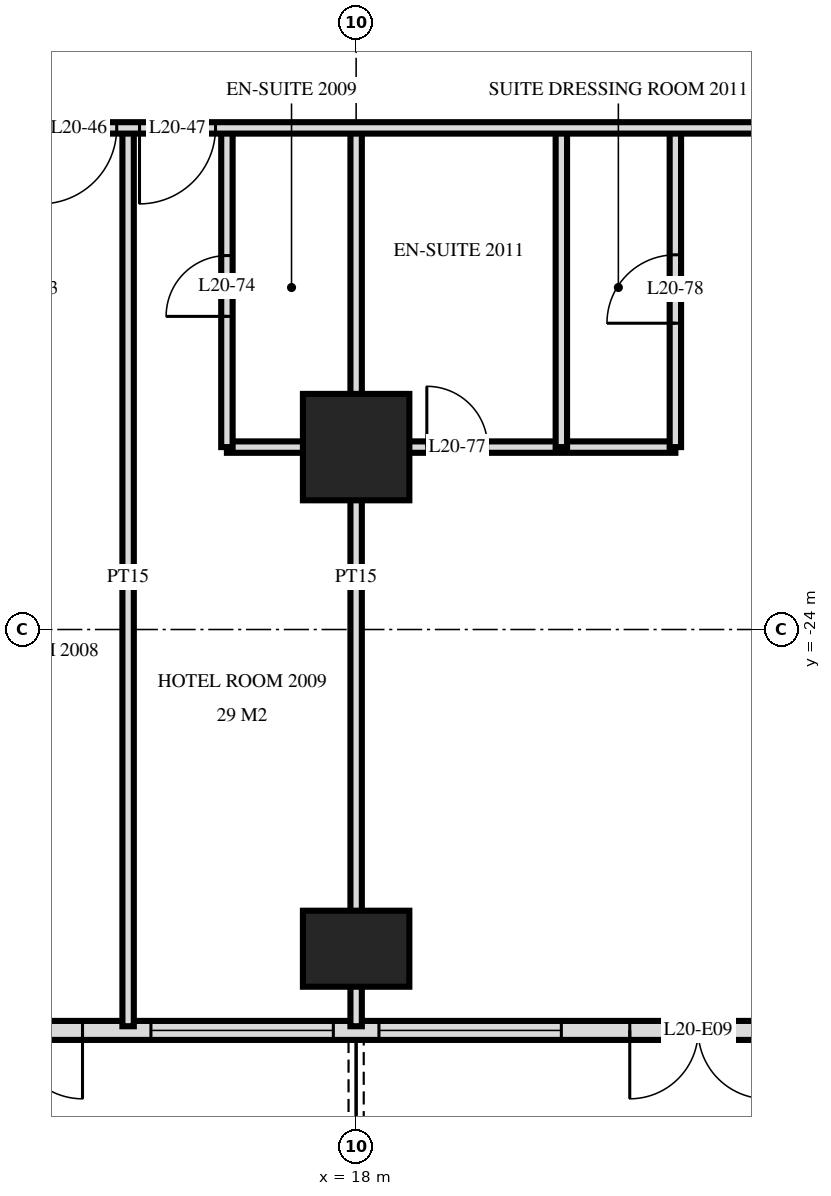
"""IFC4 building model, lengths in metres.
Left out: names, types, materials, properties, quantities, classifications, styles, units other than length and angle.
Written with IfcOpenShell. Run it as: python <this file> out.ifc"""

import sys

from ifc_helpers import new_model, si_unit, direction, frame, frame_2d, origin, origin_2d, place, context, subcontext, project, spatial, rectangle, extrude, element, fill, save


model = new_model("IFC4")
c1 = context("Model", 3, precision=1e-05, world=origin(), true_north=direction((0.0, 1.0)))
c2 = subcontext(c1, "Body", "Model", "MODEL_VIEW")
j1 = project(units=[si_unit("LENGTHUNIT", "METRE"), si_unit("PLANEANGLEUNIT", "RADIAN")], contexts=[c1])
p1 = place(None, origin())
s1 = spatial("IfcSite", under=j1, at=p1, CompositionType="ELEMENT")
p2 = place(p1, origin())
s2 = spatial("IfcBuilding", under=s1, at=p2, CompositionType="ELEMENT")
p3 = place(p2, frame((0.0, 0.0, 81.6)))
s3 = spatial("IfcBuildingStorey", under=s2, at=p3, CompositionType="ELEMENT", Elevation=81.6)
p4 = place(p3, frame((18.0, -28.2, 0.0), z_axis=(0.0, 0.0, 1.0), x_axis=(1.0, 0.0, 0.0)))
e1 = element("IfcColumn", 1, at=p4, inside=s3, PredefinedType="COLUMN", context=c2, shape_type="SweptSolid", body=[
    extrude(rectangle(XDim=1.4, YDim=1.0, at=origin_2d()), origin(), (0.0, 0.0, 1.0), 3.6),
])
p5 = place(p3, frame((18.0, -21.6, 0.0), z_axis=(0.0, 0.0, 1.0), x_axis=(1.0, 0.0, 0.0)))
e2 = element("IfcColumn", 2, at=p5, inside=s3, PredefinedType="COLUMN", context=c2, shape_type="SweptSolid", body=[
    extrude(rectangle(XDim=1.4, YDim=1.4, at=origin_2d()), origin(), (0.0, 0.0, 1.0), 3.6),
])
p6 = place(p3, frame((-28.775, -29.275, 0.0), z_axis=(0.0, 0.0, 1.0), x_axis=(1.0, 0.0, 0.0)))
e3 = element("IfcWall", 3, at=p6, inside=s3, PredefinedType="SOLIDWALL", context=c2, shape_type="SweptSolid", body=[
    extrude(rectangle(XDim=57.551, YDim=0.25, at=frame_2d((28.775, 0.0))), origin(), (0.0, 0.0, 1.0), 3.32),
])
p7 = place(p6, frame((0.575, 0.0, 0.0)))
e4 = element("IfcOpeningElement", 4, at=p7, cuts=e3, PredefinedType="OPENING", context=c2, shape_type="SweptSolid", body=[
    extrude(rectangle(XDim=1.8, YDim=2.4, at=frame_2d((0.9, 1.2))), frame((0.0, 0.135, 0.0), z_axis=(0.0, -1.0, 0.0), x_axis=(1.0, 0.0, 0.0)), (0.0, 0.0, 1.0), 0.27),
])
p8 = place(p6, frame((5.375, 0.0, 0.0)))
e5 = element("IfcOpeningElement", 5, at=p8, cuts=e3, PredefinedType="OPENING", context=c2, shape_type="SweptSolid", body=[
    extrude(rectangle(XDim=1.8, YDim=2.4, at=frame_2d((0.9, 1.2))), frame((0.0, 0.135, 0.0), z_axis=(0.0, -1.0, 0.0), x_axis=(1.0, 0.0, 0.0)), (0.0, 0.0, 1.0), 0.27),
])
p9 = place(p6, frame((8.075, 0.0, 0.3)))
e6 = element("IfcOpeningElement", 6, at=p9, cuts=e3, PredefinedType="OPENING", context=c2, shape_type="SweptSolid", body=[
    extrude(rectangle(XDim=2.4, YDim=2.1, at=frame_2d((1.2, 1.05))), frame((0.0, 0.135, 0.0), z_axis=(0.0, -1.0, 0.0), x_axis=(1.0, 0.0, 0.0)), (0.0, 0.0, 1.0), 0.27),
])
p10 = place(p6, frame((12.875, 0.0, 0.0)))
e7 = element("IfcOpeningElement", 7, at=p10, cuts=e3, PredefinedType="OPENING", context=c2, shape_type="SweptSolid", body=[
    extrude(rectangle(XDim=1.8, YDim=2.4, at=frame_2d((0.9, 1.2))), frame((0.0, 0.135, 0.0), z_axis=(0.0, -1.0, 0.0), x_axis=(1.0, 0.0, 0.0)), (0.0, 0.0, 1.0), 0.27),
])
p11 = place(p6, frame((17.375, 0.0, 0.0)))
e8 = element("IfcOpeningElement", 8, at=p11, cuts=e3, PredefinedType="OPENING", context=c2, shape_type="SweptSolid", body=[
    extrude(rectangle(XDim=1.8, YDim=2.4, at=frame_2d((0.9, 1.2))), frame((0.0, 0.135, 0.0), z_axis=(0.0, -1.0, 0.0), x_axis=(1.0, 0.0, 0.0)), (0.0, 0.0, 1.0), 0.27),
])
p12 = place(p6, frame((20.075, 0.0, 0.3)))
e9 = element("IfcOpeningElement", 9, at=p12, cuts=e3, PredefinedType="OPENING", context=c2, shape_type="SweptSolid", body=[
    extrude(rectangle(XDim=2.4, YDim=2.1, at=frame_2d((1.2, 1.05))), frame((0.0, 0.135, 0.0), z_axis=(0.0, -1.0, 0.0), x_axis=(1.0, 0.0, 0.0)), (0.0, 0.0, 1.0), 0.27),
])
p13 = place(p6, frame((23.075, 0.0, 0.3)))
e10 = element("IfcOpeningElement", 10, at=p13, cuts=e3, PredefinedType="OPENING", context=c2, shape_type="SweptSolid", body=[
    extrude(rectangle(XDim=2.4, YDim=2.1, at=frame_2d((1.2, 1.05))), frame((0.0, 0.135, 0.0), z_axis=(0.0, -1.0, 0.0), x_axis=(1.0, 0.0, 0.0)), (0.0, 0.0, 1.0), 0.27),
])
p14 = place(p6, frame((26.375, 0.0, 0.0)))
e11 = element("IfcOpeningElement", 11, at=p14, cuts=e3, PredefinedType="OPENING", context=c2, shape_type="SweptSolid", body=[
    extrude(rectangle(XDim=1.8, YDim=2.4, at=frame_2d((0.9, 1.2))), frame((0.0, 0.135, 0.0), z_axis=(0.0, -1.0, 0.0), x_axis=(1.0, 0.0, 0.0)), (0.0, 0.0, 1.0), 0.27),
])
p15 = place(p6, frame((29.075, 0.0, 0.3)))
e12 = element("IfcOpeningElement", 12, at=p15, cuts=e3, PredefinedType="OPENING", context=c2, shape_type="SweptSolid", body=[
    extrude(rectangle(XDim=2.4, YDim=2.1, at=frame_2d((1.2, 1.05))), frame((0.0, 0.135, 0.0), z_axis=(0.0, -1.0, 0.0), x_axis=(1.0, 0.0, 0.0)), (0.0, 0.0, 1.0), 0.27),
])
p16 = place(p6, frame((32.375, 0.0, 0.0)))
e13 = element("IfcOpeningElement", 13, at=p16, cuts=e3, PredefinedType="OPENING", context=c2, shape_type="SweptSolid", body=[
    extrude(rectangle(XDim=1.8, YDim=2.4, at=frame_2d((0.9, 1.2))), frame((0.0, 0.135, 0.0), z_axis=(0.0, -1.0, 0.0), x_axis=(1.0, 0.0, 0.0)), (0.0, 0.0, 1.0), 0.27),
])
p17 = place(p6, frame((35.375, 0.0, 0.0)))
e14 = element("IfcOpeningElement", 14, at=p17, cuts=e3, PredefinedType="OPENING", context=c2, shape_type="SweptSolid", body=[
    extrude(rectangle(XDim=1.8, YDim=2.4, at=frame_2d((0.9, 1.2))), frame((0.0, 0.135, 0.0), z_axis=(0.0, -1.0, 0.0), x_axis=(1.0, 0.0, 0.0)), (0.0, 0.0, 1.0), 0.27),
])
p18 = place(p6, frame((38.075, 0.0, 0.3)))
e15 = element("IfcOpeningElement", 15, at=p18, cuts=e3, PredefinedType="OPENING", context=c2, shape_type="SweptSolid", body=[
    extrude(rectangle(XDim=2.4, YDim=2.1, at=frame_2d((1.2, 1.05))), frame((0.0, 0.135, 0.0), z_axis=(0.0, -1.0, 0.0), x_axis=(1.0, 0.0, 0.0)), (0.0, 0.0, 1.0), 0.27),
])
p19 = place(p6, frame((41.375, 0.0, 0.0)))
e16 = element("IfcOpeningElement", 16, at=p19, cuts=e3, PredefinedType="OPENING", context=c2, shape_type="SweptSolid", body=[
    extrude(rectangle(XDim=1.8, YDim=2.4, at=frame_2d((0.9, 1.2))), frame((0.0, 0.135, 0.0), z_axis=(0.0, -1.0, 0.0), x_axis=(1.0, 0.0, 0.0)), (0.0, 0.0, 1.0), 0.27),
])
p20 = place(p6, frame((44.075, 0.0, 0.3)))
e17 = element("IfcOpeningElement", 17, at=p20, cuts=e3, PredefinedType="OPENING", context=c2, shape_type="SweptSolid", body=[
    extrude(rectangle(XDim=2.4, YDim=2.1, at=frame_2d((1.2, 1.05))), frame((0.0, 0.135, 0.0), z_axis=(0.0, -1.0, 0.0), x_axis=(1.0, 0.0, 0.0)), (0.0, 0.0, 1.0), 0.27),
])
p21 = place(p6, frame((47.075, 0.0, 0.3)))
e18 = element("IfcOpeningElement", 18, at=p21, cuts=e3, PredefinedType="OPENING", context=c2, shape_type="SweptSolid", body=[
    extrude(rectangle(XDim=2.4, YDim=2.1, at=frame_2d((1.2, 1.05))), frame((0.0, 0.135, 0.0), z_axis=(0.0, -1.0, 0.0), x_axis=(1.0, 0.0, 0.0)), (0.0, 0.0, 1.0), 0.27),
])
p22 = place(p6, frame((50.375, 0.0, 0.0)))
e19 = element("IfcOpeningElement", 19, at=p22, cuts=e3, PredefinedType="OPENING", context=c2, shape_type="SweptSolid", body=[
    extrude(rectangle(XDim=1.8, YDim=2.4, at=frame_2d((0.9, 1.2))), frame((0.0, 0.135, 0.0), z_axis=(0.0, -1.0, 0.0), x_axis=(1.0, 0.0, 0.0)), (0.0, 0.0, 1.0), 0.27),
])
p23 = place(p6, frame((53.375, 0.0, 0.0)))
e20 = element("IfcOpeningElement", 20, at=p23, cuts=e3, PredefinedType="OPENING", context=c2, shape_type="SweptSolid", body=[
    extrude(rectangle(XDim=1.8, YDim=2.4, at=frame_2d((0.9, 1.2))), frame((0.0, 0.135, 0.0), z_axis=(0.0, -1.0, 0.0), x_axis=(1.0, 0.0, 0.0)), (0.0, 0.0, 1.0), 0.27),
])
p24 = place(p3, frame((22.2, -21.6, 0.0), z_axis=(0.0, 0.0, 1.0), x_axis=(0.0, 1.0, 0.0)))
e21 = element("IfcWall", 21, at=p24, inside=s3, PredefinedType="PARTITIONING", context=c2, shape_type="SweptSolid", body=[
    extrude(rectangle(XDim=4.2, YDim=0.15, at=frame_2d((2.1, 0.0))), origin(), (0.0, 0.0, 1.0), 3.32),
])
p25 = place(p24, frame((1.63, 0.0, 0.0)))
e22 = element("IfcOpeningElement", 22, at=p25, cuts=e21, PredefinedType="OPENING", context=c2, shape_type="SweptSolid", body=[
    extrude(rectangle(XDim=0.9, YDim=2.1, at=frame_2d((0.45, 1.05))), frame((0.0, 0.085, 0.0), z_axis=(0.0, -1.0, 0.0), x_axis=(1.0, 0.0, 0.0)), (0.0, 0.0, 1.0), 0.17),
])
p26 = place(p3, frame((20.7, -21.6, 0.0), z_axis=(0.0, 0.0, 1.0), x_axis=(0.0, 1.0, 0.0)))
e23 = element("IfcWall", 23, at=p26, inside=s3, PredefinedType="PARTITIONING", context=c2, shape_type="SweptSolid", body=[
    extrude(rectangle(XDim=4.2, YDim=0.15, at=frame_2d((2.1, 0.0))), origin(), (0.0, 0.0, 1.0), 3.32),
])
p27 = place(p3, frame((18.0, -29.22, 0.0), z_axis=(0.0, 0.0, 1.0), x_axis=(0.0, 1.0, 0.0)))
e24 = element("IfcWall", 24, at=p27, inside=s3, PredefinedType="PARTITIONING", context=c2, shape_type="SweptSolid", body=[
    extrude(rectangle(XDim=11.82, YDim=0.15, at=frame_2d((5.91, 0.0))), origin(), (0.0, 0.0, 1.0), 3.32),
])
p28 = place(p3, frame((16.3, -21.6, 0.0), z_axis=(0.0, 0.0, 1.0), x_axis=(0.0, 1.0, 0.0)))
e25 = element("IfcWall", 25, at=p28, inside=s3, PredefinedType="PARTITIONING", context=c2, shape_type="SweptSolid", body=[
    extrude(rectangle(XDim=4.2, YDim=0.15, at=frame_2d((2.1, 0.0))), origin(), (0.0, 0.0, 1.0), 3.32),
])
p29 = place(p28, frame((1.72, 0.0, 0.0)))
e26 = element("IfcOpeningElement", 26, at=p29, cuts=e25, PredefinedType="OPENING", context=c2, shape_type="SweptSolid", body=[
    extrude(rectangle(XDim=0.8, YDim=2.1, at=frame_2d((0.4, 1.05))), frame((0.0, 0.085, 0.0), z_axis=(0.0, -1.0, 0.0), x_axis=(1.0, 0.0, 0.0)), (0.0, 0.0, 1.0), 0.17),
])
p30 = place(p3, frame((15.0, -29.22, 0.0), z_axis=(0.0, 0.0, 1.0), x_axis=(0.0, 1.0, 0.0)))
e27 = element("IfcWall", 27, at=p30, inside=s3, PredefinedType="PARTITIONING", context=c2, shape_type="SweptSolid", body=[
    extrude(rectangle(XDim=11.82, YDim=0.15, at=frame_2d((5.91, 0.0))), origin(), (0.0, 0.0, 1.0), 3.32),
])
p31 = place(p3, frame((16.3, -21.6, 0.0), z_axis=(0.0, 0.0, 1.0), x_axis=(1.0, 0.0, 0.0)))
e28 = element("IfcWall", 28, at=p31, inside=s3, PredefinedType="PARTITIONING", context=c2, shape_type="SweptSolid", body=[
    extrude(rectangle(XDim=5.9, YDim=0.15, at=frame_2d((2.95, 0.0))), origin(), (0.0, 0.0, 1.0), 3.32),
])
p32 = place(p31, frame((2.63, 0.0, 0.0)))
e29 = element("IfcOpeningElement", 29, at=p32, cuts=e28, PredefinedType="OPENING", context=c2, shape_type="SweptSolid", body=[
    extrude(rectangle(XDim=0.8, YDim=2.1, at=frame_2d((0.4, 1.05))), frame((0.0, 0.085, 0.0), z_axis=(0.0, -1.0, 0.0), x_axis=(1.0, 0.0, 0.0)), (0.0, 0.0, 1.0), 0.17),
])
p33 = place(p3, frame((-33.12, -17.4, 0.0), z_axis=(0.0, 0.0, 1.0), x_axis=(1.0, 0.0, 0.0)))
e30 = element("IfcWall", 30, at=p33, inside=s3, PredefinedType="PARTITIONING", context=c2, shape_type="SweptSolid", body=[
    extrude(rectangle(XDim=66.24, YDim=0.15, at=frame_2d((33.12, 0.0))), origin(), (0.0, 0.0, 1.0), 3.32),
])
p34 = place(p33, frame((9.27, 0.0, 0.0)))
e31 = element("IfcOpeningElement", 31, at=p34, cuts=e30, PredefinedType="OPENING", context=c2, shape_type="SweptSolid", body=[
    extrude(rectangle(XDim=1.0, YDim=2.1, at=frame_2d((0.5, 1.05))), frame((0.0, 0.085, 0.0), z_axis=(0.0, -1.0, 0.0), x_axis=(1.0, 0.0, 0.0)), (0.0, 0.0, 1.0), 0.17),
])
p35 = place(p33, frame((13.97, 0.0, 0.0)))
e32 = element("IfcOpeningElement", 32, at=p35, cuts=e30, PredefinedType="OPENING", context=c2, shape_type="SweptSolid", body=[
    extrude(rectangle(XDim=1.0, YDim=2.1, at=frame_2d((0.5, 1.05))), frame((0.0, 0.085, 0.0), z_axis=(0.0, -1.0, 0.0), x_axis=(1.0, 0.0, 0.0)), (0.0, 0.0, 1.0), 0.17),
])
p36 = place(p33, frame((17.62, 0.0, 0.0)))
e33 = element("IfcOpeningElement", 33, at=p36, cuts=e30, PredefinedType="OPENING", context=c2, shape_type="SweptSolid", body=[
    extrude(rectangle(XDim=1.0, YDim=2.1, at=frame_2d((0.5, 1.05))), frame((0.0, 0.085, 0.0), z_axis=(0.0, -1.0, 0.0), x_axis=(1.0, 0.0, 0.0)), (0.0, 0.0, 1.0), 0.17),
])
p37 = place(p33, frame((21.27, 0.0, 0.0)))
e34 = element("IfcOpeningElement", 34, at=p37, cuts=e30, PredefinedType="OPENING", context=c2, shape_type="SweptSolid", body=[
    extrude(rectangle(XDim=1.0, YDim=2.1, at=frame_2d((0.5, 1.05))), frame((0.0, 0.085, 0.0), z_axis=(0.0, -1.0, 0.0), x_axis=(1.0, 0.0, 0.0)), (0.0, 0.0, 1.0), 0.17),
])
p38 = place(p33, frame((25.97, 0.0, 0.0)))
e35 = element("IfcOpeningElement", 35, at=p38, cuts=e30, PredefinedType="OPENING", context=c2, shape_type="SweptSolid", body=[
    extrude(rectangle(XDim=1.0, YDim=2.1, at=frame_2d((0.5, 1.05))), frame((0.0, 0.085, 0.0), z_axis=(0.0, -1.0, 0.0), x_axis=(1.0, 0.0, 0.0)), (0.0, 0.0, 1.0), 0.17),
])
p39 = place(p33, frame((35.62, 0.0, 0.0)))
e36 = element("IfcOpeningElement", 36, at=p39, cuts=e30, PredefinedType="OPENING", context=c2, shape_type="SweptSolid", body=[
    extrude(rectangle(XDim=1.0, YDim=2.1, at=frame_2d((0.5, 1.05))), frame((0.0, 0.085, 0.0), z_axis=(0.0, -1.0, 0.0), x_axis=(1.0, 0.0, 0.0)), (0.0, 0.0, 1.0), 0.17),
])
p40 = place(p33, frame((40.97, 0.0, 0.0)))
e37 = element("IfcOpeningElement", 37, at=p40, cuts=e30, PredefinedType="OPENING", context=c2, shape_type="SweptSolid", body=[
    extrude(rectangle(XDim=1.0, YDim=2.1, at=frame_2d((0.5, 1.05))), frame((0.0, 0.085, 0.0), z_axis=(0.0, -1.0, 0.0), x_axis=(1.0, 0.0, 0.0)), (0.0, 0.0, 1.0), 0.17),
])
p41 = place(p33, frame((42.27, 0.0, 0.0)))
e38 = element("IfcOpeningElement", 38, at=p41, cuts=e30, PredefinedType="OPENING", context=c2, shape_type="SweptSolid", body=[
    extrude(rectangle(XDim=1.0, YDim=2.1, at=frame_2d((0.5, 1.05))), frame((0.0, 0.085, 0.0), z_axis=(0.0, -1.0, 0.0), x_axis=(1.0, 0.0, 0.0)), (0.0, 0.0, 1.0), 0.17),
])
p42 = place(p33, frame((46.97, 0.0, 0.0)))
e39 = element("IfcOpeningElement", 39, at=p42, cuts=e30, PredefinedType="OPENING", context=c2, shape_type="SweptSolid", body=[
    extrude(rectangle(XDim=1.0, YDim=2.1, at=frame_2d((0.5, 1.05))), frame((0.0, 0.085, 0.0), z_axis=(0.0, -1.0, 0.0), x_axis=(1.0, 0.0, 0.0)), (0.0, 0.0, 1.0), 0.17),
])
p43 = place(p33, frame((48.27, 0.0, 0.0)))
e40 = element("IfcOpeningElement", 40, at=p43, cuts=e30, PredefinedType="OPENING", context=c2, shape_type="SweptSolid", body=[
    extrude(rectangle(XDim=1.0, YDim=2.1, at=frame_2d((0.5, 1.05))), frame((0.0, 0.085, 0.0), z_axis=(0.0, -1.0, 0.0), x_axis=(1.0, 0.0, 0.0)), (0.0, 0.0, 1.0), 0.17),
])
p44 = place(p33, frame((1.87, 0.0, 0.0)))
e41 = element("IfcOpeningElement", 41, at=p44, cuts=e30, PredefinedType="OPENING", context=c2, shape_type="SweptSolid", body=[
    extrude(rectangle(XDim=1.0, YDim=2.1, at=frame_2d((0.5, 1.05))), frame((0.0, 0.085, 0.0), z_axis=(0.0, -1.0, 0.0), x_axis=(1.0, 0.0, 0.0)), (0.0, 0.0, 1.0), 0.17),
])
p45 = place(p33, frame((60.37, 0.0, 0.0)))
e42 = element("IfcOpeningElement", 42, at=p45, cuts=e30, PredefinedType="OPENING", context=c2, shape_type="SweptSolid", body=[
    extrude(rectangle(XDim=1.0, YDim=2.1, at=frame_2d((0.5, 1.05))), frame((0.0, 0.085, 0.0), z_axis=(0.0, -1.0, 0.0), x_axis=(1.0, 0.0, 0.0)), (0.0, 0.0, 1.0), 0.17),
])
p46 = place(p19, frame((0.9, 0.0, 0.0), z_axis=(0.0, 0.0, 1.0), x_axis=(-1.0, 0.0, 0.0)))
e43 = element("IfcDoor", 43, at=p46, inside=s3, OperationType="DOUBLE_DOOR_SINGLE_SWING", PredefinedType="DOOR", context=c2, shape_type="SweptSolid", body=[
    extrude(rectangle(XDim=1.8, YDim=2.4, at=frame_2d((0.0, 1.2))), frame((0.0, -0.025, 0.0), z_axis=(0.0, 1.0, 0.0), x_axis=(-1.0, 0.0, 0.0)), (0.0, 0.0, 1.0), 0.05),
])
fill(e16, e43)
p47 = place(p20, origin())
e44 = element("IfcWindow", 44, at=p47, inside=s3, PartitioningType="SINGLE_PANEL", PredefinedType="WINDOW", context=c2, shape_type="SweptSolid", body=[
    extrude(rectangle(XDim=2.4, YDim=2.1, at=frame_2d((1.2, 1.05))), frame((0.0, 0.03, 0.0), z_axis=(0.0, -1.0, 0.0), x_axis=(1.0, 0.0, 0.0)), (0.0, 0.0, 1.0), 0.06),
])
fill(e17, e44)
p48 = place(p21, origin())
e45 = element("IfcWindow", 45, at=p48, inside=s3, PartitioningType="SINGLE_PANEL", PredefinedType="WINDOW", context=c2, shape_type="SweptSolid", body=[
    extrude(rectangle(XDim=2.4, YDim=2.1, at=frame_2d((1.2, 1.05))), frame((0.0, 0.03, 0.0), z_axis=(0.0, -1.0, 0.0), x_axis=(1.0, 0.0, 0.0)), (0.0, 0.0, 1.0), 0.06),
])
fill(e18, e45)
p49 = place(p22, frame((0.9, 0.0, 0.0), z_axis=(0.0, 0.0, 1.0), x_axis=(-1.0, 0.0, 0.0)))
e46 = element("IfcDoor", 46, at=p49, inside=s3, OperationType="DOUBLE_DOOR_SINGLE_SWING", PredefinedType="DOOR", context=c2, shape_type="SweptSolid", body=[
    extrude(rectangle(XDim=1.8, YDim=2.4, at=frame_2d((0.0, 1.2))), frame((0.0, -0.025, 0.0), z_axis=(0.0, 1.0, 0.0), x_axis=(-1.0, 0.0, 0.0)), (0.0, 0.0, 1.0), 0.05),
])
fill(e19, e46)
p50 = place(p42, frame((0.5, 0.0, 0.0), z_axis=(0.0, 0.0, 1.0), x_axis=(-1.0, 0.0, 0.0)))
e47 = element("IfcDoor", 47, at=p50, inside=s3, OperationType="SINGLE_SWING_LEFT", PredefinedType="DOOR", context=c2, shape_type="SweptSolid", body=[
    extrude(rectangle(XDim=1.0, YDim=2.1, at=frame_2d((0.0, 1.05))), frame((0.0, -0.025, 0.0), z_axis=(0.0, 1.0, 0.0), x_axis=(-1.0, 0.0, 0.0)), (0.0, 0.0, 1.0), 0.05),
])
fill(e39, e47)
p51 = place(p43, frame((0.5, 0.0, 0.0), z_axis=(0.0, 0.0, 1.0), x_axis=(-1.0, 0.0, 0.0)))
e48 = element("IfcDoor", 48, at=p51, inside=s3, OperationType="SINGLE_SWING_LEFT", PredefinedType="DOOR", context=c2, shape_type="SweptSolid", body=[
    extrude(rectangle(XDim=1.0, YDim=2.1, at=frame_2d((0.0, 1.05))), frame((0.0, -0.025, 0.0), z_axis=(0.0, 1.0, 0.0), x_axis=(-1.0, 0.0, 0.0)), (0.0, 0.0, 1.0), 0.05),
])
fill(e40, e48)
p52 = place(p29, origin())
e49 = element("IfcDoor", 49, at=p52, inside=s3, OperationType="SINGLE_SWING_RIGHT", PredefinedType="DOOR", context=c2, shape_type="SweptSolid", body=[
    extrude(rectangle(XDim=0.8, YDim=2.1, at=frame_2d((0.4, 1.05))), frame((0.0, 0.025, 0.0), z_axis=(0.0, -1.0, 0.0), x_axis=(1.0, 0.0, 0.0)), (0.0, 0.0, 1.0), 0.05),
])
fill(e26, e49)
p53 = place(p32, origin())
e50 = element("IfcDoor", 50, at=p53, inside=s3, OperationType="SINGLE_SWING_RIGHT", PredefinedType="DOOR", context=c2, shape_type="SweptSolid", body=[
    extrude(rectangle(XDim=0.8, YDim=2.1, at=frame_2d((0.4, 1.05))), frame((0.0, 0.025, 0.0), z_axis=(0.0, -1.0, 0.0), x_axis=(1.0, 0.0, 0.0)), (0.0, 0.0, 1.0), 0.05),
])
fill(e29, e50)
p54 = place(p25, origin())
e51 = element("IfcDoor", 51, at=p54, inside=s3, OperationType="SINGLE_SWING_RIGHT", PredefinedType="DOOR", context=c2, shape_type="SweptSolid", body=[
    extrude(rectangle(XDim=0.9, YDim=2.1, at=frame_2d((0.45, 1.05))), frame((0.0, 0.025, 0.0), z_axis=(0.0, -1.0, 0.0), x_axis=(1.0, 0.0, 0.0)), (0.0, 0.0, 1.0), 0.05),
])
fill(e22, e51)
save(model, sys.argv[1])
